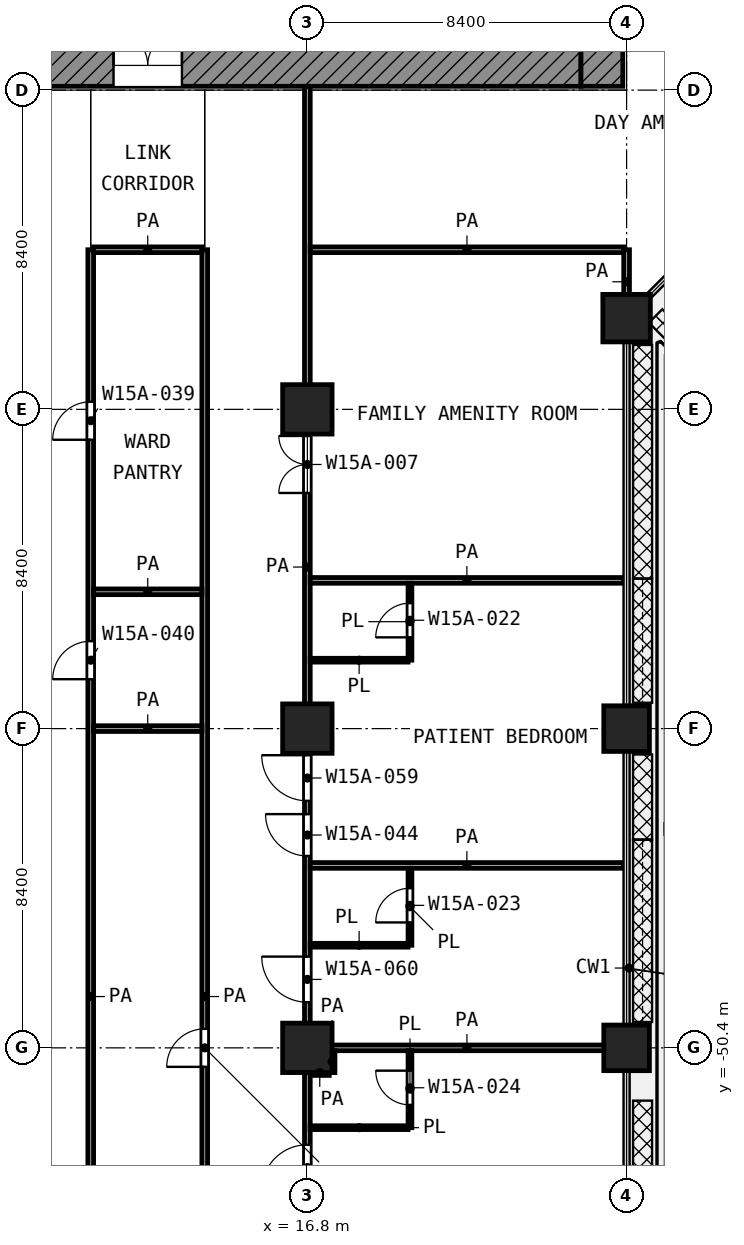
"""IFC4 building model, lengths in metres.
Left out: names, types, materials, properties, quantities, classifications, styles, units other than length and angle.
Written with IfcOpenShell. Run it as: python <this file> out.ifc"""

import sys

from ifc_helpers import new_model, si_unit, direction, frame, frame_2d, origin, origin_2d, place, context, subcontext, project, spatial, rectangle, extrude, element, fill, save


model = new_model("IFC4")
c1 = context("Model", 3, precision=1e-05, world=origin(), true_north=direction((0.0, 1.0)))
c2 = subcontext(c1, "Body", "Model", "MODEL_VIEW")
j1 = project(units=[si_unit("LENGTHUNIT", "METRE"), si_unit("PLANEANGLEUNIT", "RADIAN")], contexts=[c1])
p1 = place(None, origin())
s1 = spatial("IfcSite", under=j1, at=p1, CompositionType="ELEMENT")
p2 = place(p1, origin())
s2 = spatial("IfcBuilding", under=s1, at=p2, CompositionType="ELEMENT")
p3 = place(p2, frame((0.0, 0.0, 68.6)))
s3 = spatial("IfcBuildingStorey", under=s2, at=p3, CompositionType="ELEMENT", Elevation=68.6)
p4 = place(p3, frame((25.2, -31.2, 0.0), z_axis=(0.0, 0.0, 1.0), x_axis=(1.0, 0.0, 0.0)))
e1 = element("IfcColumn", 1, at=p4, inside=s3, PredefinedType="COLUMN", context=c2, shape_type="SweptSolid", body=[
    extrude(rectangle(XDim=1.25, YDim=1.25, at=origin_2d()), origin(), (0.0, 0.0, 1.0), 4.2),
])
for number, where, z_axis, x_axis in (
    (2, (16.8, -33.6, 0.0), (0.0, 0.0, 1.0), (1.0, 0.0, 0.0)),
    (3, (16.8, -42.0, 0.0), (0.0, 0.0, 1.0), (1.0, 0.0, 0.0)),
):
    element("IfcColumn", number, at=place(p3, frame(where, z_axis=z_axis, x_axis=x_axis)), inside=s3, PredefinedType="COLUMN", context=c2, shape_type="SweptSolid", body=[
        extrude(rectangle(XDim=1.3, YDim=1.3, at=origin_2d()), origin(), (0.0, 0.0, 1.0), 4.2),
    ])
p5 = place(p3, frame((25.2, -42.0, 0.0), z_axis=(0.0, 0.0, 1.0), x_axis=(1.0, 0.0, 0.0)))
e4 = element("IfcColumn", 4, at=p5, inside=s3, PredefinedType="COLUMN", context=c2, shape_type="SweptSolid", body=[
    extrude(rectangle(XDim=1.2, YDim=1.2, at=origin_2d()), origin(), (0.0, 0.0, 1.0), 4.2),
])
p6 = place(p3, frame((16.8, -50.4, 0.0), z_axis=(0.0, 0.0, 1.0), x_axis=(1.0, 0.0, 0.0)))
e5 = element("IfcColumn", 5, at=p6, inside=s3, PredefinedType="COLUMN", context=c2, shape_type="SweptSolid", body=[
    extrude(rectangle(XDim=1.3, YDim=1.3, at=origin_2d()), origin(), (0.0, 0.0, 1.0), 4.2),
])
p7 = place(p3, frame((25.2, -50.4, 0.0), z_axis=(0.0, 0.0, 1.0), x_axis=(1.0, 0.0, 0.0)))
e6 = element("IfcColumn", 6, at=p7, inside=s3, PredefinedType="COLUMN", context=c2, shape_type="SweptSolid", body=[
    extrude(rectangle(XDim=1.2, YDim=1.2, at=origin_2d()), origin(), (0.0, 0.0, 1.0), 4.2),
])
p8 = place(p3, frame((5.4, -24.55, 0.0), z_axis=(0.0, 0.0, 1.0), x_axis=(1.0, 0.0, 0.0)))
e7 = element("IfcWall", 7, at=p8, inside=s3, PredefinedType="SHEAR", context=c2, shape_type="SweptSolid", body=[
    extrude(rectangle(XDim=18.6, YDim=1.1, at=frame_2d((9.3, 0.0))), origin(), (0.0, 0.0, 1.0), 3.9),
])
p9 = place(p8, frame((6.3, 0.0, 0.0)))
e8 = element("IfcOpeningElement", 8, at=p9, cuts=e7, PredefinedType="OPENING", context=c2, shape_type="SweptSolid", body=[
    extrude(rectangle(XDim=1.8, YDim=2.1, at=frame_2d((0.9, 1.05))), frame((0.0, 0.56, 0.0), z_axis=(0.0, -1.0, 0.0), x_axis=(1.0, 0.0, 0.0)), (0.0, 0.0, 1.0), 1.12),
])
p10 = place(p3, frame((24.55, -25.1, 0.0), z_axis=(0.0, 0.0, 1.0), x_axis=(0.0, 1.0, 0.0)))
e9 = element("IfcWall", 9, at=p10, inside=s3, PredefinedType="SHEAR", context=c2, shape_type="SweptSolid", body=[
    extrude(rectangle(XDim=1.1, YDim=1.1, at=frame_2d((0.55, 0.0))), origin(), (0.0, 0.0, 1.0), 3.9),
])
for number, where, z_axis, x_axis in (
    (10, (16.875, -52.5, 0.0), (0.0, 0.0, 1.0), (1.0, 0.0, 0.0)),
    (11, (16.875, -47.7, 0.0), (0.0, 0.0, 1.0), (1.0, 0.0, 0.0)),
):
    element("IfcWall", number, at=place(p3, frame(where, z_axis=z_axis, x_axis=x_axis)), inside=s3, PredefinedType="PARTITIONING", context=c2, shape_type="SweptSolid", body=[
        extrude(rectangle(XDim=2.575, YDim=0.1, at=frame_2d((1.288, 0.0))), origin(), (0.0, 0.0, 1.0), 3.9),
    ])
p11 = place(p3, frame((16.875, -40.2, 0.0), z_axis=(0.0, 0.0, 1.0), x_axis=(1.0, 0.0, 0.0)))
e12 = element("IfcWall", 12, at=p11, inside=s3, PredefinedType="PARTITIONING", context=c2, shape_type="SweptSolid", body=[
    extrude(rectangle(XDim=2.574, YDim=0.1, at=frame_2d((1.287, 0.0))), origin(), (0.0, 0.0, 1.0), 3.9),
])
p12 = place(p3, frame((19.5, -52.5, 0.0), z_axis=(0.0, 0.0, 1.0), x_axis=(0.0, 1.0, 0.0)))
e13 = element("IfcWall", 13, at=p12, inside=s3, PredefinedType="PARTITIONING", context=c2, shape_type="SweptSolid", body=[
    extrude(rectangle(XDim=2.025, YDim=0.1, at=frame_2d((1.012, 0.0))), origin(), (0.0, 0.0, 1.0), 3.9),
])
p13 = place(p12, frame((0.6, 0.0, 0.0)))
e14 = element("IfcOpeningElement", 14, at=p13, cuts=e13, PredefinedType="OPENING", context=c2, shape_type="SweptSolid", body=[
    extrude(rectangle(XDim=0.9, YDim=2.1, at=frame_2d((0.45, 1.05))), frame((0.0, 0.06, 0.0), z_axis=(0.0, -1.0, 0.0), x_axis=(1.0, 0.0, 0.0)), (0.0, 0.0, 1.0), 0.12),
])
p14 = place(p3, frame((19.5, -47.7, 0.0), z_axis=(0.0, 0.0, 1.0), x_axis=(0.0, 1.0, 0.0)))
e15 = element("IfcWall", 15, at=p14, inside=s3, PredefinedType="PARTITIONING", context=c2, shape_type="SweptSolid", body=[
    extrude(rectangle(XDim=2.025, YDim=0.1, at=frame_2d((1.012, 0.0))), origin(), (0.0, 0.0, 1.0), 3.9),
])
p15 = place(p14, frame((0.6, 0.0, 0.0)))
e16 = element("IfcOpeningElement", 16, at=p15, cuts=e15, PredefinedType="OPENING", context=c2, shape_type="SweptSolid", body=[
    extrude(rectangle(XDim=0.9, YDim=2.1, at=frame_2d((0.45, 1.05))), frame((0.0, 0.06, 0.0), z_axis=(0.0, -1.0, 0.0), x_axis=(1.0, 0.0, 0.0)), (0.0, 0.0, 1.0), 0.12),
])
p16 = place(p3, frame((19.5, -40.198, 0.0), z_axis=(0.0, 0.0, 1.0), x_axis=(0.0, 1.0, 0.0)))
e17 = element("IfcWall", 17, at=p16, inside=s3, PredefinedType="PARTITIONING", context=c2, shape_type="SweptSolid", body=[
    extrude(rectangle(XDim=2.023, YDim=0.1, at=frame_2d((1.011, 0.0))), origin(), (0.0, 0.0, 1.0), 3.9),
])
p17 = place(p16, frame((0.599, 0.0, 0.0)))
e18 = element("IfcOpeningElement", 18, at=p17, cuts=e17, PredefinedType="OPENING", context=c2, shape_type="SweptSolid", body=[
    extrude(rectangle(XDim=0.9, YDim=2.1, at=frame_2d((0.45, 1.05))), frame((0.0, 0.06, 0.0), z_axis=(0.0, -1.0, 0.0), x_axis=(1.0, 0.0, 0.0)), (0.0, 0.0, 1.0), 0.12),
])
p18 = place(p3, frame((16.877, -51.05, 0.0), z_axis=(0.0, 0.0, 1.0), x_axis=(1.0, 0.0, 0.0)))
e19 = element("IfcWall", 19, at=p18, inside=s3, PredefinedType="PARTITIONING", context=c2, shape_type="SweptSolid", body=[
    extrude(rectangle(XDim=0.498, YDim=0.15, at=frame_2d((0.249, 0.0))), origin(), (0.0, 0.0, 1.0), 3.9),
])
p19 = place(p3, frame((16.877, -50.4, 0.0), z_axis=(0.0, 0.0, 1.0), x_axis=(1.0, 0.0, 0.0)))
e20 = element("IfcWall", 20, at=p19, inside=s3, PredefinedType="PARTITIONING", context=c2, shape_type="SweptSolid", body=[
    extrude(rectangle(XDim=8.243, YDim=0.15, at=frame_2d((4.122, 0.0))), origin(), (0.0, 0.0, 1.0), 3.9),
])
p20 = place(p3, frame((16.875, -45.6, 0.0), z_axis=(0.0, 0.0, 1.0), x_axis=(1.0, 0.0, 0.0)))
e21 = element("IfcWall", 21, at=p20, inside=s3, PredefinedType="PARTITIONING", context=c2, shape_type="SweptSolid", body=[
    extrude(rectangle(XDim=8.245, YDim=0.15, at=frame_2d((4.123, 0.0))), origin(), (0.0, 0.0, 1.0), 3.9),
])
for number, where, z_axis, x_axis in (
    (22, (11.175, -42.0, 0.0), (0.0, 0.0, 1.0), (1.0, 0.0, 0.0)),
    (23, (11.175, -38.4, 0.0), (0.0, 0.0, 1.0), (1.0, 0.0, 0.0)),
):
    element("IfcWall", number, at=place(p3, frame(where, z_axis=z_axis, x_axis=x_axis)), inside=s3, PredefinedType="PARTITIONING", context=c2, shape_type="SweptSolid", body=[
        extrude(rectangle(XDim=2.85, YDim=0.15, at=frame_2d((1.425, 0.0))), origin(), (0.0, 0.0, 1.0), 3.9),
    ])
p21 = place(p3, frame((16.875, -38.1, 0.0), z_axis=(0.0, 0.0, 1.0), x_axis=(1.0, 0.0, 0.0)))
e24 = element("IfcWall", 24, at=p21, inside=s3, PredefinedType="PARTITIONING", context=c2, shape_type="SweptSolid", body=[
    extrude(rectangle(XDim=8.245, YDim=0.15, at=frame_2d((4.123, 0.0))), origin(), (0.0, 0.0, 1.0), 3.9),
])
p22 = place(p3, frame((11.175, -29.4, 0.0), z_axis=(0.0, 0.0, 1.0), x_axis=(1.0, 0.0, 0.0)))
e25 = element("IfcWall", 25, at=p22, inside=s3, PredefinedType="PARTITIONING", context=c2, shape_type="SweptSolid", body=[
    extrude(rectangle(XDim=2.85, YDim=0.15, at=frame_2d((1.425, 0.0))), origin(), (0.0, 0.0, 1.0), 3.9),
])
p23 = place(p3, frame((16.875, -29.4, 0.0), z_axis=(0.0, 0.0, 1.0), x_axis=(1.0, 0.0, 0.0)))
e26 = element("IfcWall", 26, at=p23, inside=s3, PredefinedType="PARTITIONING", context=c2, shape_type="SweptSolid", body=[
    extrude(rectangle(XDim=8.25, YDim=0.15, at=frame_2d((4.125, 0.0))), origin(), (0.0, 0.0, 1.0), 3.9),
])
p24 = place(p3, frame((11.1, -68.7, 0.0), z_axis=(0.0, 0.0, 1.0), x_axis=(0.0, 1.0, 0.0)))
e27 = element("IfcWall", 27, at=p24, inside=s3, PredefinedType="PARTITIONING", context=c2, shape_type="SweptSolid", body=[
    extrude(rectangle(XDim=39.3, YDim=0.15, at=frame_2d((19.65, 0.0))), origin(), (0.0, 0.0, 1.0), 3.9),
])
p25 = place(p24, frame((34.3, 0.0, 0.0)))
e28 = element("IfcOpeningElement", 28, at=p25, cuts=e27, PredefinedType="OPENING", context=c2, shape_type="SweptSolid", body=[
    extrude(rectangle(XDim=1.0, YDim=2.1, at=frame_2d((0.5, 1.05))), frame((0.0, 0.085, 0.0), z_axis=(0.0, -1.0, 0.0), x_axis=(1.0, 0.0, 0.0)), (0.0, 0.0, 1.0), 0.17),
])
p26 = place(p24, frame((28.0, 0.0, 0.0)))
e29 = element("IfcOpeningElement", 29, at=p26, cuts=e27, PredefinedType="OPENING", context=c2, shape_type="SweptSolid", body=[
    extrude(rectangle(XDim=1.0, YDim=2.1, at=frame_2d((0.5, 1.05))), frame((0.0, 0.085, 0.0), z_axis=(0.0, -1.0, 0.0), x_axis=(1.0, 0.0, 0.0)), (0.0, 0.0, 1.0), 0.17),
])
p27 = place(p24, frame((4.45, 0.0, 0.0)))
e30 = element("IfcOpeningElement", 30, at=p27, cuts=e27, PredefinedType="OPENING", context=c2, shape_type="SweptSolid", body=[
    extrude(rectangle(XDim=1.0, YDim=2.1, at=frame_2d((0.5, 1.05))), frame((0.0, 0.085, 0.0), z_axis=(0.0, -1.0, 0.0), x_axis=(1.0, 0.0, 0.0)), (0.0, 0.0, 1.0), 0.17),
])
p28 = place(p3, frame((14.1, -68.7, 0.0), z_axis=(0.0, 0.0, 1.0), x_axis=(0.0, 1.0, 0.0)))
e31 = element("IfcWall", 31, at=p28, inside=s3, PredefinedType="PARTITIONING", context=c2, shape_type="SweptSolid", body=[
    extrude(rectangle(XDim=39.3, YDim=0.15, at=frame_2d((19.65, 0.0))), origin(), (0.0, 0.0, 1.0), 3.9),
])
p29 = place(p28, frame((17.8, 0.0, 0.0)))
e32 = element("IfcOpeningElement", 32, at=p29, cuts=e31, PredefinedType="OPENING", context=c2, shape_type="SweptSolid", body=[
    extrude(rectangle(XDim=1.0, YDim=2.1, at=frame_2d((0.5, 1.05))), frame((0.0, 0.085, 0.0), z_axis=(0.0, -1.0, 0.0), x_axis=(1.0, 0.0, 0.0)), (0.0, 0.0, 1.0), 0.17),
])
p30 = place(p3, frame((16.8, -71.32, 0.0), z_axis=(0.0, 0.0, 1.0), x_axis=(0.0, 1.0, 0.0)))
e33 = element("IfcWall", 33, at=p30, inside=s3, PredefinedType="PARTITIONING", context=c2, shape_type="SweptSolid", body=[
    extrude(rectangle(XDim=20.268, YDim=0.15, at=frame_2d((10.134, 0.0))), origin(), (0.0, 0.0, 1.0), 3.9),
])
p31 = place(p30, frame((17.17, 0.0, 0.0)))
e34 = element("IfcOpeningElement", 34, at=p31, cuts=e33, PredefinedType="OPENING", context=c2, shape_type="SweptSolid", body=[
    extrude(rectangle(XDim=1.2, YDim=2.1, at=frame_2d((0.6, 1.05))), frame((0.0, 0.085, 0.0), z_axis=(0.0, -1.0, 0.0), x_axis=(1.0, 0.0, 0.0)), (0.0, 0.0, 1.0), 0.17),
])
p32 = place(p30, frame((15.62, 0.0, 0.0)))
e35 = element("IfcOpeningElement", 35, at=p32, cuts=e33, PredefinedType="OPENING", context=c2, shape_type="SweptSolid", body=[
    extrude(rectangle(XDim=1.2, YDim=2.1, at=frame_2d((0.6, 1.05))), frame((0.0, 0.085, 0.0), z_axis=(0.0, -1.0, 0.0), x_axis=(1.0, 0.0, 0.0)), (0.0, 0.0, 1.0), 0.17),
])
p33 = place(p30, frame((13.22, 0.0, 0.0)))
e36 = element("IfcOpeningElement", 36, at=p33, cuts=e33, PredefinedType="OPENING", context=c2, shape_type="SweptSolid", body=[
    extrude(rectangle(XDim=1.2, YDim=2.1, at=frame_2d((0.6, 1.05))), frame((0.0, 0.085, 0.0), z_axis=(0.0, -1.0, 0.0), x_axis=(1.0, 0.0, 0.0)), (0.0, 0.0, 1.0), 0.17),
])
p34 = place(p30, frame((10.62, 0.0, 0.0)))
e37 = element("IfcOpeningElement", 37, at=p34, cuts=e33, PredefinedType="OPENING", context=c2, shape_type="SweptSolid", body=[
    extrude(rectangle(XDim=1.2, YDim=2.1, at=frame_2d((0.6, 1.05))), frame((0.0, 0.085, 0.0), z_axis=(0.0, -1.0, 0.0), x_axis=(1.0, 0.0, 0.0)), (0.0, 0.0, 1.0), 0.17),
])
p35 = place(p30, frame((1.87, 0.0, 0.0)))
e38 = element("IfcOpeningElement", 38, at=p35, cuts=e33, PredefinedType="OPENING", context=c2, shape_type="SweptSolid", body=[
    extrude(rectangle(XDim=1.5, YDim=2.1, at=frame_2d((0.75, 1.05))), frame((0.0, 0.085, 0.0), z_axis=(0.0, -1.0, 0.0), x_axis=(1.0, 0.0, 0.0)), (0.0, 0.0, 1.0), 0.17),
])
p36 = place(p3, frame((16.8, -50.398, 0.0), z_axis=(0.0, 0.0, 1.0), x_axis=(0.0, 1.0, 0.0)))
e39 = element("IfcWall", 39, at=p36, inside=s3, PredefinedType="PARTITIONING", context=c2, shape_type="SweptSolid", body=[
    extrude(rectangle(XDim=25.298, YDim=0.15, at=frame_2d((12.649, 0.0))), origin(), (0.0, 0.0, 1.0), 3.9),
])
p37 = place(p36, frame((14.598, 0.0, 0.0)))
e40 = element("IfcOpeningElement", 40, at=p37, cuts=e39, PredefinedType="OPENING", context=c2, shape_type="SweptSolid", body=[
    extrude(rectangle(XDim=1.5, YDim=2.1, at=frame_2d((0.75, 1.05))), frame((0.0, 0.085, 0.0), z_axis=(0.0, -1.0, 0.0), x_axis=(1.0, 0.0, 0.0)), (0.0, 0.0, 1.0), 0.17),
])
p38 = place(p36, frame((6.498, 0.0, 0.0)))
e41 = element("IfcOpeningElement", 41, at=p38, cuts=e39, PredefinedType="OPENING", context=c2, shape_type="SweptSolid", body=[
    extrude(rectangle(XDim=1.2, YDim=2.1, at=frame_2d((0.6, 1.05))), frame((0.0, 0.085, 0.0), z_axis=(0.0, -1.0, 0.0), x_axis=(1.0, 0.0, 0.0)), (0.0, 0.0, 1.0), 0.17),
])
p39 = place(p36, frame((5.048, 0.0, 0.0)))
e42 = element("IfcOpeningElement", 42, at=p39, cuts=e39, PredefinedType="OPENING", context=c2, shape_type="SweptSolid", body=[
    extrude(rectangle(XDim=1.1, YDim=2.1, at=frame_2d((0.55, 1.05))), frame((0.0, 0.085, 0.0), z_axis=(0.0, -1.0, 0.0), x_axis=(1.0, 0.0, 0.0)), (0.0, 0.0, 1.0), 0.17),
])
p40 = place(p36, frame((1.199, 0.0, 0.0)))
e43 = element("IfcOpeningElement", 43, at=p40, cuts=e39, PredefinedType="OPENING", context=c2, shape_type="SweptSolid", body=[
    extrude(rectangle(XDim=1.2, YDim=2.1, at=frame_2d((0.6, 1.05))), frame((0.0, 0.085, 0.0), z_axis=(0.0, -1.0, 0.0), x_axis=(1.0, 0.0, 0.0)), (0.0, 0.0, 1.0), 0.17),
])
p41 = place(p3, frame((17.45, -51.05, 0.0), z_axis=(0.0, 0.0, 1.0), x_axis=(0.0, 1.0, 0.0)))
e44 = element("IfcWall", 44, at=p41, inside=s3, PredefinedType="PARTITIONING", context=c2, shape_type="SweptSolid", body=[
    extrude(rectangle(XDim=0.575, YDim=0.15, at=frame_2d((0.288, 0.0))), origin(), (0.0, 0.0, 1.0), 3.9),
])
p42 = place(p3, frame((25.2, -31.087, 0.0), z_axis=(0.0, 0.0, 1.0), x_axis=(0.0, 1.0, 0.0)))
e45 = element("IfcWall", 45, at=p42, inside=s3, PredefinedType="PARTITIONING", context=c2, shape_type="SweptSolid", body=[
    extrude(rectangle(XDim=1.687, YDim=0.15, at=frame_2d((0.844, 0.0))), origin(), (0.0, 0.0, 1.0), 3.9),
])
p43 = place(p9, origin())
e46 = element("IfcDoor", 46, at=p43, inside=s3, OperationType="DOUBLE_DOOR_SINGLE_SWING", PredefinedType="DOOR", context=c2, shape_type="SweptSolid", body=[
    extrude(rectangle(XDim=1.8, YDim=2.1, at=frame_2d((0.9, 1.05))), frame((0.0, 0.025, 0.0), z_axis=(0.0, -1.0, 0.0), x_axis=(1.0, 0.0, 0.0)), (0.0, 0.0, 1.0), 0.05),
])
fill(e8, e46)
p44 = place(p25, origin())
e47 = element("IfcDoor", 47, at=p44, inside=s3, OperationType="SINGLE_SWING_LEFT", PredefinedType="DOOR", context=c2, shape_type="SweptSolid", body=[
    extrude(rectangle(XDim=1.0, YDim=2.1, at=frame_2d((0.5, 1.05))), frame((0.0, 0.025, 0.0), z_axis=(0.0, -1.0, 0.0), x_axis=(1.0, 0.0, 0.0)), (0.0, 0.0, 1.0), 0.05),
])
fill(e28, e47)
p45 = place(p26, origin())
e48 = element("IfcDoor", 48, at=p45, inside=s3, OperationType="SINGLE_SWING_LEFT", PredefinedType="DOOR", context=c2, shape_type="SweptSolid", body=[
    extrude(rectangle(XDim=1.0, YDim=2.1, at=frame_2d((0.5, 1.05))), frame((0.0, 0.025, 0.0), z_axis=(0.0, -1.0, 0.0), x_axis=(1.0, 0.0, 0.0)), (0.0, 0.0, 1.0), 0.05),
])
fill(e29, e48)
p46 = place(p29, origin())
e49 = element("IfcDoor", 49, at=p46, inside=s3, OperationType="SINGLE_SWING_LEFT", PredefinedType="DOOR", context=c2, shape_type="SweptSolid", body=[
    extrude(rectangle(XDim=1.0, YDim=2.1, at=frame_2d((0.5, 1.05))), frame((0.0, 0.025, 0.0), z_axis=(0.0, -1.0, 0.0), x_axis=(1.0, 0.0, 0.0)), (0.0, 0.0, 1.0), 0.05),
])
fill(e32, e49)
p47 = place(p37, origin())
e50 = element("IfcDoor", 50, at=p47, inside=s3, OperationType="DOUBLE_DOOR_SINGLE_SWING", PredefinedType="DOOR", context=c2, shape_type="SweptSolid", body=[
    extrude(rectangle(XDim=1.5, YDim=2.1, at=frame_2d((0.75, 1.05))), frame((0.0, 0.025, 0.0), z_axis=(0.0, -1.0, 0.0), x_axis=(1.0, 0.0, 0.0)), (0.0, 0.0, 1.0), 0.05),
])
fill(e40, e50)
p48 = place(p38, origin())
e51 = element("IfcDoor", 51, at=p48, inside=s3, OperationType="SINGLE_SWING_RIGHT", PredefinedType="DOOR", context=c2, shape_type="SweptSolid", body=[
    extrude(rectangle(XDim=1.2, YDim=2.1, at=frame_2d((0.6, 1.05))), frame((0.0, 0.025, 0.0), z_axis=(0.0, -1.0, 0.0), x_axis=(1.0, 0.0, 0.0)), (0.0, 0.0, 1.0), 0.05),
])
fill(e41, e51)
p49 = place(p39, origin())
e52 = element("IfcDoor", 52, at=p49, inside=s3, OperationType="SINGLE_SWING_RIGHT", PredefinedType="DOOR", context=c2, shape_type="SweptSolid", body=[
    extrude(rectangle(XDim=1.1, YDim=2.1, at=frame_2d((0.55, 1.05))), frame((0.0, 0.025, 0.0), z_axis=(0.0, -1.0, 0.0), x_axis=(1.0, 0.0, 0.0)), (0.0, 0.0, 1.0), 0.05),
])
fill(e42, e52)
p50 = place(p17, origin())
e53 = element("IfcDoor", 53, at=p50, inside=s3, OperationType="SINGLE_SWING_LEFT", PredefinedType="DOOR", context=c2, shape_type="SweptSolid", body=[
    extrude(rectangle(XDim=0.9, YDim=2.1, at=frame_2d((0.45, 1.05))), frame((0.0, 0.025, 0.0), z_axis=(0.0, -1.0, 0.0), x_axis=(1.0, 0.0, 0.0)), (0.0, 0.0, 1.0), 0.05),
])
fill(e18, e53)
p51 = place(p40, origin())
e54 = element("IfcDoor", 54, at=p51, inside=s3, OperationType="SINGLE_SWING_RIGHT", PredefinedType="DOOR", context=c2, shape_type="SweptSolid", body=[
    extrude(rectangle(XDim=1.2, YDim=2.1, at=frame_2d((0.6, 1.05))), frame((0.0, 0.025, 0.0), z_axis=(0.0, -1.0, 0.0), x_axis=(1.0, 0.0, 0.0)), (0.0, 0.0, 1.0), 0.05),
])
fill(e43, e54)
p52 = place(p15, origin())
e55 = element("IfcDoor", 55, at=p52, inside=s3, OperationType="SINGLE_SWING_LEFT", PredefinedType="DOOR", context=c2, shape_type="SweptSolid", body=[
    extrude(rectangle(XDim=0.9, YDim=2.1, at=frame_2d((0.45, 1.05))), frame((0.0, 0.025, 0.0), z_axis=(0.0, -1.0, 0.0), x_axis=(1.0, 0.0, 0.0)), (0.0, 0.0, 1.0), 0.05),
])
fill(e16, e55)
p53 = place(p31, origin())
e56 = element("IfcDoor", 56, at=p53, inside=s3, OperationType="SINGLE_SWING_LEFT", PredefinedType="DOOR", context=c2, shape_type="SweptSolid", body=[
    extrude(rectangle(XDim=1.2, YDim=2.1, at=frame_2d((0.6, 1.05))), frame((0.0, 0.025, 0.0), z_axis=(0.0, -1.0, 0.0), x_axis=(1.0, 0.0, 0.0)), (0.0, 0.0, 1.0), 0.05),
])
fill(e34, e56)
p54 = place(p13, origin())
e57 = element("IfcDoor", 57, at=p54, inside=s3, OperationType="SINGLE_SWING_RIGHT", PredefinedType="DOOR", context=c2, shape_type="SweptSolid", body=[
    extrude(rectangle(XDim=0.9, YDim=2.1, at=frame_2d((0.45, 1.05))), frame((0.0, 0.025, 0.0), z_axis=(0.0, -1.0, 0.0), x_axis=(1.0, 0.0, 0.0)), (0.0, 0.0, 1.0), 0.05),
])
fill(e14, e57)
save(model, sys.argv[1])
